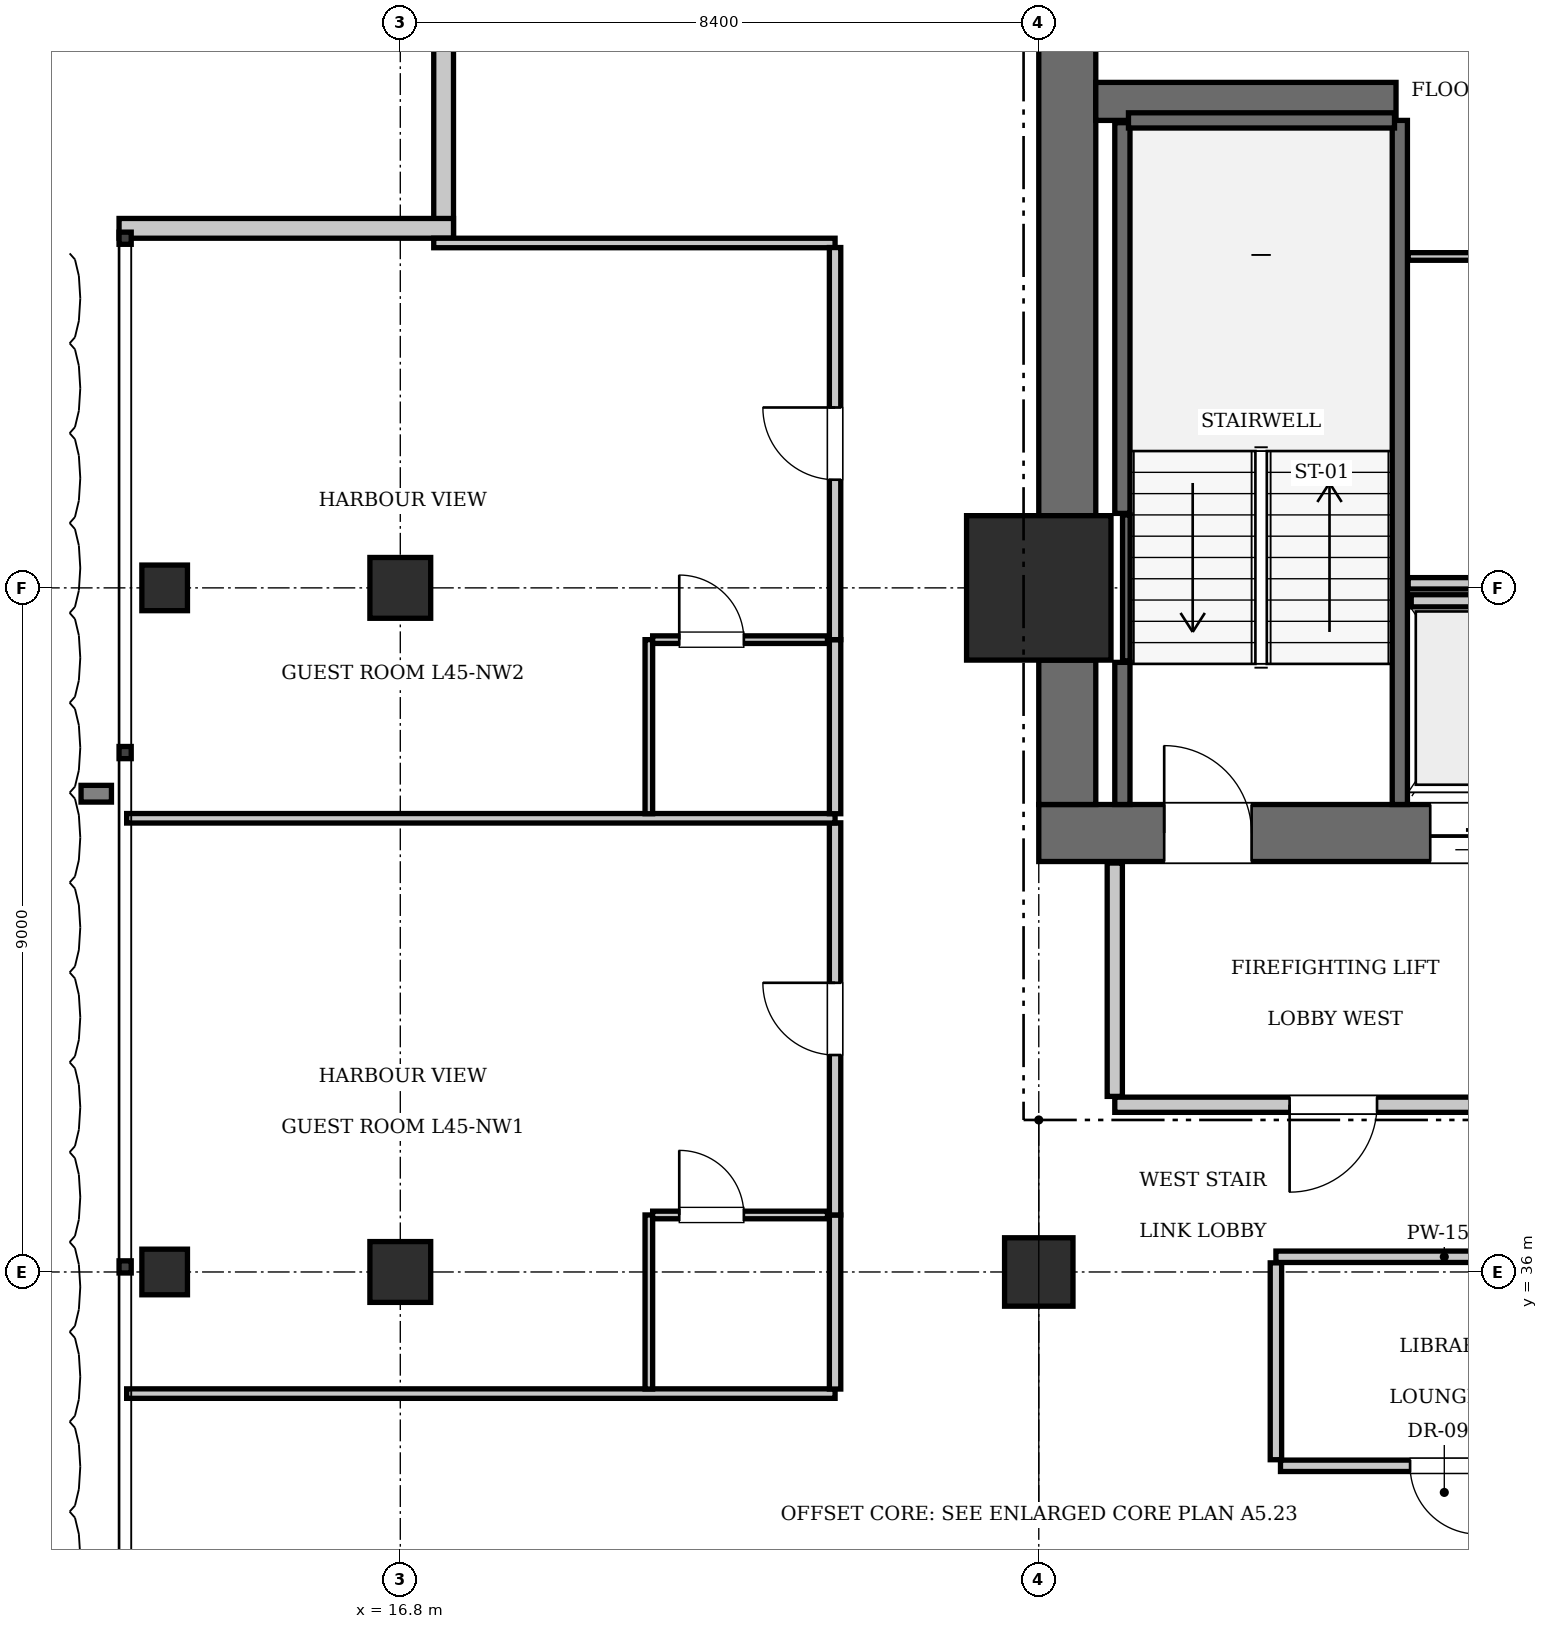
"""IFC4 building model, lengths in metres.
Left out: names, types, materials, properties, quantities, classifications, styles, units other than length and angle.
Written with IfcOpenShell. Run it as: python <this file> out.ifc"""

import sys

from ifc_helpers import new_model, si_unit, direction, frame, frame_2d, origin, origin_2d, place, context, subcontext, project, spatial, rectangle, i_section, extrude, element, fill, save


model = new_model("IFC4")
c1 = context("Model", 3, precision=1e-05, world=origin(), true_north=direction((0.0, 1.0)))
c2 = subcontext(c1, "Body", "Model", "MODEL_VIEW")
j1 = project(units=[si_unit("LENGTHUNIT", "METRE"), si_unit("PLANEANGLEUNIT", "RADIAN")], contexts=[c1])
p1 = place(None, origin())
s1 = spatial("IfcSite", under=j1, at=p1, CompositionType="ELEMENT")
p2 = place(p1, origin())
s2 = spatial("IfcBuilding", under=s1, at=p2, CompositionType="ELEMENT")
p3 = place(p2, frame((0.0, 0.0, 185.15)))
s3 = spatial("IfcBuildingStorey", under=s2, at=p3, CompositionType="ELEMENT", Elevation=185.15)
p4 = place(p3, frame((25.2, 45.0, 0.0), z_axis=(0.0, 0.0, 1.0), x_axis=(1.0, 0.0, 0.0)))
e1 = element("IfcColumn", 1, at=p4, inside=s3, PredefinedType="COLUMN", context=c2, shape_type="SweptSolid", body=[
    extrude(rectangle(XDim=1.9, YDim=1.9, at=origin_2d()), origin(), (0.0, 0.0, 1.0), 3.85),
])
p5 = place(p3, frame((25.2, 41.775, 0.0), z_axis=(0.0, 0.0, 1.0), x_axis=(1.0, 0.0, 0.0)))
e2 = element("IfcWall", 2, at=p5, inside=s3, PredefinedType="SHEAR", context=c2, shape_type="SweptSolid", body=[
    extrude(rectangle(XDim=6.8, YDim=0.75, at=frame_2d((3.4, 0.0))), origin(), (0.0, 0.0, 1.0), 3.85),
])
p6 = place(p5, frame((1.65, 0.0, 0.0)))
e3 = element("IfcOpeningElement", 3, at=p6, cuts=e2, PredefinedType="OPENING", context=c2, shape_type="SweptSolid", body=[
    extrude(rectangle(XDim=1.15, YDim=2.15, at=frame_2d((0.575, 1.075))), frame((0.0, 0.385, 0.0), z_axis=(0.0, -1.0, 0.0), x_axis=(1.0, 0.0, 0.0)), (0.0, 0.0, 1.0), 0.77),
])
p7 = place(p5, frame((5.15, 0.0, 0.0)))
e4 = element("IfcOpeningElement", 4, at=p7, cuts=e2, PredefinedType="OPENING", context=c2, shape_type="SweptSolid", body=[
    extrude(rectangle(XDim=1.1, YDim=2.2, at=frame_2d((0.55, 1.1))), frame((0.0, 0.385, 0.0), z_axis=(0.0, -1.0, 0.0), x_axis=(1.0, 0.0, 0.0)), (0.0, 0.0, 1.0), 0.77),
])
p8 = place(p3, frame((25.575, 42.15, 0.0), z_axis=(0.0, 0.0, 1.0), x_axis=(0.0, 1.0, 0.0)))
e5 = element("IfcWall", 5, at=p8, inside=s3, PredefinedType="SHEAR", context=c2, shape_type="SweptSolid", body=[
    extrude(rectangle(XDim=1.9, YDim=0.75, at=frame_2d((0.95, 0.0))), origin(), (0.0, 0.0, 1.0), 3.85),
])
p9 = place(p3, frame((25.575, 45.95, 0.0), z_axis=(0.0, 0.0, 1.0), x_axis=(0.0, 1.0, 0.0)))
e6 = element("IfcWall", 6, at=p9, inside=s3, PredefinedType="SHEAR", context=c2, shape_type="SweptSolid", body=[
    extrude(rectangle(XDim=7.3, YDim=0.75, at=frame_2d((3.65, 0.0))), origin(), (0.0, 0.0, 1.0), 3.85),
])
p10 = place(p3, frame((25.95, 51.4, 0.0), z_axis=(0.0, 0.0, 1.0), x_axis=(1.0, 0.0, 0.0)))
e7 = element("IfcWall", 7, at=p10, inside=s3, PredefinedType="SHEAR", context=c2, shape_type="SweptSolid", body=[
    extrude(rectangle(XDim=3.95, YDim=0.5, at=frame_2d((1.975, 0.0))), origin(), (0.0, 0.0, 1.0), 3.85),
])
p11 = place(p3, frame((25.2, 36.0, 0.0), z_axis=(0.0, 0.0, 1.0), x_axis=(1.0, 0.0, 0.0)))
e8 = element("IfcColumn", 8, at=p11, inside=s3, PredefinedType="COLUMN", context=c2, shape_type="SweptSolid", body=[
    extrude(rectangle(XDim=0.9, YDim=0.9, at=origin_2d()), origin(), (0.0, 0.0, 1.0), 3.85),
])
for number, where, z_axis, x_axis in (
    (9, (16.8, 36.0, 0.0), (0.0, 0.0, 1.0), (1.0, 0.0, 0.0)),
    (10, (16.8, 45.0, 0.0), (0.0, 0.0, 1.0), (1.0, 0.0, 0.0)),
):
    element("IfcColumn", number, at=place(p3, frame(where, z_axis=z_axis, x_axis=x_axis)), inside=s3, PredefinedType="COLUMN", context=c2, shape_type="SweptSolid", body=[
        extrude(rectangle(XDim=0.8, YDim=0.8, at=origin_2d()), origin(), (0.0, 0.0, 1.0), 3.85),
    ])
for number, where, z_axis, x_axis in (
    (11, (13.7, 36.0, 0.0), (0.0, 0.0, 1.0), (1.0, 0.0, 0.0)),
    (12, (13.7, 45.0, 0.0), (0.0, 0.0, 1.0), (1.0, 0.0, 0.0)),
):
    element("IfcColumn", number, at=place(p3, frame(where, z_axis=z_axis, x_axis=x_axis)), inside=s3, PredefinedType="COLUMN", context=c2, shape_type="SweptSolid", body=[
        extrude(i_section(OverallWidth=0.6, OverallDepth=0.6, WebThickness=0.025, FlangeThickness=0.038, at=origin_2d()), origin(), (0.0, 0.0, 1.0), 3.85),
    ])
p12 = place(p3, frame((29.95, 42.15, 0.0), z_axis=(0.0, 0.0, 1.0), x_axis=(0.0, 1.0, 0.0)))
e13 = element("IfcWall", 13, at=p12, inside=s3, PredefinedType="SOLIDWALL", context=c2, shape_type="SweptSolid", body=[
    extrude(rectangle(XDim=9.0, YDim=0.2, at=frame_2d((4.5, 0.0))), origin(), (0.0, 0.0, 1.0), 3.61),
])
p13 = place(p3, frame((26.3, 42.15, 0.0), z_axis=(0.0, 0.0, 1.0), x_axis=(0.0, 1.0, 0.0)))
e14 = element("IfcWall", 14, at=p13, inside=s3, PredefinedType="SOLIDWALL", context=c2, shape_type="SweptSolid", body=[
    extrude(rectangle(XDim=1.87, YDim=0.2, at=frame_2d((0.935, 0.0))), origin(), (0.0, 0.0, 1.0), 3.61),
])
p14 = place(p3, frame((26.3, 45.98, 0.0), z_axis=(0.0, 0.0, 1.0), x_axis=(0.0, 1.0, 0.0)))
e15 = element("IfcWall", 15, at=p14, inside=s3, PredefinedType="SOLIDWALL", context=c2, shape_type="SweptSolid", body=[
    extrude(rectangle(XDim=5.14, YDim=0.2, at=frame_2d((2.57, 0.0))), origin(), (0.0, 0.0, 1.0), 3.61),
])
p15 = place(p3, frame((26.38, 51.15, 0.0), z_axis=(0.0, 0.0, 1.0), x_axis=(1.0, 0.0, 0.0)))
e16 = element("IfcWall", 16, at=p15, inside=s3, PredefinedType="SOLIDWALL", context=c2, shape_type="SweptSolid", body=[
    extrude(rectangle(XDim=3.5, YDim=0.2, at=frame_2d((1.75, 0.0))), origin(), (0.0, 0.0, 1.0), 3.61),
])
p16 = place(p3, frame((26.352, 44.04, 0.0), z_axis=(0.0, 0.0, 1.0), x_axis=(0.0, 1.0, 0.0)))
e17 = element("IfcWall", 17, at=p16, inside=s3, PredefinedType="SOLIDWALL", context=c2, shape_type="SweptSolid", body=[
    extrude(rectangle(XDim=1.92, YDim=0.1, at=frame_2d((0.96, 0.0))), origin(), (0.0, 0.0, 1.0), 3.61),
])
p17 = place(p3, frame((30.1, 44.83, 0.0), z_axis=(0.0, 0.0, 1.0), x_axis=(1.0, 0.0, 0.0)))
e18 = element("IfcWall", 18, at=p17, inside=s3, PredefinedType="SOLIDWALL", context=c2, shape_type="SweptSolid", body=[
    extrude(rectangle(XDim=1.6, YDim=0.16, at=frame_2d((0.8, 0.0))), origin(), (0.0, 0.0, 1.0), 3.61),
])
for number, where, z_axis, x_axis in (
    (19, (17.37, 49.6, 0.0), (0.0, 0.0, 1.0), (0.0, 1.0, 0.0)),
    (20, (13.1, 49.73, 0.0), (0.0, 0.0, 1.0), (1.0, 0.0, 0.0)),
):
    element("IfcWall", number, at=place(p3, frame(where, z_axis=z_axis, x_axis=x_axis)), inside=s3, PredefinedType="SOLIDWALL", context=c2, shape_type="SweptSolid", body=[
        extrude(rectangle(XDim=4.4, YDim=0.26, at=frame_2d((2.2, 0.0))), origin(), (0.0, 0.0, 1.0), 3.61),
    ])
p18 = place(p3, frame((26.2, 38.2, 0.0), z_axis=(0.0, 0.0, 1.0), x_axis=(1.0, 0.0, 0.0)))
e21 = element("IfcWall", 21, at=p18, inside=s3, PredefinedType="PARTITIONING", context=c2, shape_type="SweptSolid", body=[
    extrude(rectangle(XDim=5.8, YDim=0.2, at=frame_2d((2.9, 0.0))), origin(), (0.0, 0.0, 1.0), 3.61),
])
p19 = place(p18, frame((2.3, 0.0, 0.0)))
e22 = element("IfcOpeningElement", 22, at=p19, cuts=e21, PredefinedType="OPENING", context=c2, shape_type="SweptSolid", body=[
    extrude(rectangle(XDim=1.15, YDim=2.15, at=frame_2d((0.575, 1.075))), frame((0.0, 0.11, 0.0), z_axis=(0.0, -1.0, 0.0), x_axis=(1.0, 0.0, 0.0)), (0.0, 0.0, 1.0), 0.22),
])
p20 = place(p3, frame((26.2, 38.31, 0.0), z_axis=(0.0, 0.0, 1.0), x_axis=(0.0, 1.0, 0.0)))
e23 = element("IfcWall", 23, at=p20, inside=s3, PredefinedType="PARTITIONING", context=c2, shape_type="SweptSolid", body=[
    extrude(rectangle(XDim=3.07, YDim=0.2, at=frame_2d((1.535, 0.0))), origin(), (0.0, 0.0, 1.0), 3.61),
])
p21 = place(p3, frame((30.06, 45.06, 0.0), z_axis=(0.0, 0.0, 1.0), x_axis=(1.0, 0.0, 0.0)))
e24 = element("IfcWall", 24, at=p21, inside=s3, PredefinedType="PARTITIONING", context=c2, shape_type="SweptSolid", body=[
    extrude(rectangle(XDim=3.18, YDim=0.15, at=frame_2d((1.59, 0.0))), origin(), (0.0, 0.0, 1.0), 3.61),
])
p22 = place(p3, frame((30.06, 49.36, 0.0), z_axis=(0.0, 0.0, 1.0), x_axis=(1.0, 0.0, 0.0)))
e25 = element("IfcWall", 25, at=p22, inside=s3, PredefinedType="PARTITIONING", context=c2, shape_type="SweptSolid", body=[
    extrude(rectangle(XDim=3.18, YDim=0.1, at=frame_2d((1.59, 0.0))), origin(), (0.0, 0.0, 1.0), 3.61),
])
p23 = place(p22, frame((1.95, 0.0, 0.0)))
e26 = element("IfcOpeningElement", 26, at=p23, cuts=e25, PredefinedType="OPENING", context=c2, shape_type="SweptSolid", body=[
    extrude(rectangle(XDim=0.8, YDim=2.05, at=frame_2d((0.4, 1.025))), frame((0.0, 0.06, 0.0), z_axis=(0.0, -1.0, 0.0), x_axis=(1.0, 0.0, 0.0)), (0.0, 0.0, 1.0), 0.12),
])
p24 = place(p3, frame((28.32, 36.2, 0.0), z_axis=(0.0, 0.0, 1.0), x_axis=(1.0, 0.0, 0.0)))
e27 = element("IfcWall", 27, at=p24, inside=s3, PredefinedType="PARTITIONING", context=c2, shape_type="SweptSolid", body=[
    extrude(rectangle(XDim=4.43, YDim=0.15, at=frame_2d((2.215, 0.0))), origin(), (0.0, 0.0, 1.0), 3.61),
])
p25 = place(p3, frame((28.32, 33.53, 0.0), z_axis=(0.0, 0.0, 1.0), x_axis=(0.0, 1.0, 0.0)))
e28 = element("IfcWall", 28, at=p25, inside=s3, PredefinedType="PARTITIONING", context=c2, shape_type="SweptSolid", body=[
    extrude(rectangle(XDim=2.59, YDim=0.15, at=frame_2d((1.295, 0.0))), origin(), (0.0, 0.0, 1.0), 3.61),
])
p26 = place(p3, frame((28.38, 33.45, 0.0), z_axis=(0.0, 0.0, 1.0), x_axis=(1.0, 0.0, 0.0)))
e29 = element("IfcWall", 29, at=p26, inside=s3, PredefinedType="PARTITIONING", context=c2, shape_type="SweptSolid", body=[
    extrude(rectangle(XDim=4.31, YDim=0.15, at=frame_2d((2.155, 0.0))), origin(), (0.0, 0.0, 1.0), 3.61),
])
p27 = place(p26, frame((1.705, 0.0, 0.0)))
e30 = element("IfcOpeningElement", 30, at=p27, cuts=e29, PredefinedType="OPENING", context=c2, shape_type="SweptSolid", body=[
    extrude(rectangle(XDim=0.9, YDim=2.1, at=frame_2d((0.45, 1.05))), frame((0.0, 0.085, 0.0), z_axis=(0.0, -1.0, 0.0), x_axis=(1.0, 0.0, 0.0)), (0.0, 0.0, 1.0), 0.17),
])
p28 = place(p3, frame((13.2, 34.4, 0.0), z_axis=(0.0, 0.0, 1.0), x_axis=(1.0, 0.0, 0.0)))
e31 = element("IfcWall", 31, at=p28, inside=s3, PredefinedType="PARTITIONING", context=c2, shape_type="SweptSolid", body=[
    extrude(rectangle(XDim=9.32, YDim=0.125, at=frame_2d((4.66, 0.0))), origin(), (0.0, 0.0, 1.0), 3.61),
])
p29 = place(p3, frame((17.24, 49.538, 0.0), z_axis=(0.0, 0.0, 1.0), x_axis=(1.0, 0.0, 0.0)))
e32 = element("IfcWall", 32, at=p29, inside=s3, PredefinedType="PARTITIONING", context=c2, shape_type="SweptSolid", body=[
    extrude(rectangle(XDim=5.28, YDim=0.125, at=frame_2d((2.64, 0.0))), origin(), (0.0, 0.0, 1.0), 3.61),
])
p30 = place(p3, frame((22.52, 34.46, 0.0), z_axis=(0.0, 0.0, 1.0), x_axis=(0.0, 1.0, 0.0)))
e33 = element("IfcWall", 33, at=p30, inside=s3, PredefinedType="PARTITIONING", context=c2, shape_type="SweptSolid", body=[
    extrude(rectangle(XDim=2.29, YDim=0.15, at=frame_2d((1.145, 0.0))), origin(), (0.0, 0.0, 1.0), 3.61),
])
p31 = place(p3, frame((22.52, 36.75, 0.0), z_axis=(0.0, 0.0, 1.0), x_axis=(0.0, 1.0, 0.0)))
e34 = element("IfcWall", 34, at=p31, inside=s3, PredefinedType="PARTITIONING", context=c2, shape_type="SweptSolid", body=[
    extrude(rectangle(XDim=5.159, YDim=0.15, at=frame_2d((2.579, 0.0))), origin(), (0.0, 0.0, 1.0), 3.61),
])
p32 = place(p31, frame((2.104, 0.0, 0.0)))
e35 = element("IfcOpeningElement", 35, at=p32, cuts=e34, PredefinedType="OPENING", context=c2, shape_type="SweptSolid", body=[
    extrude(rectangle(XDim=0.95, YDim=2.15, at=frame_2d((0.475, 1.075))), frame((0.0, 0.085, 0.0), z_axis=(0.0, -1.0, 0.0), x_axis=(1.0, 0.0, 0.0)), (0.0, 0.0, 1.0), 0.17),
])
p33 = place(p3, frame((20.07, 34.46, 0.0), z_axis=(0.0, 0.0, 1.0), x_axis=(0.0, 1.0, 0.0)))
e36 = element("IfcWall", 36, at=p33, inside=s3, PredefinedType="PARTITIONING", context=c2, shape_type="SweptSolid", body=[
    extrude(rectangle(XDim=2.29, YDim=0.1, at=frame_2d((1.145, 0.0))), origin(), (0.0, 0.0, 1.0), 3.61),
])
p34 = place(p3, frame((20.12, 36.75, 0.0), z_axis=(0.0, 0.0, 1.0), x_axis=(1.0, 0.0, 0.0)))
e37 = element("IfcWall", 37, at=p34, inside=s3, PredefinedType="PARTITIONING", context=c2, shape_type="SweptSolid", body=[
    extrude(rectangle(XDim=2.3, YDim=0.1, at=frame_2d((1.15, 0.0))), origin(), (0.0, 0.0, 1.0), 3.61),
])
p35 = place(p34, frame((0.35, 0.0, 0.0)))
e38 = element("IfcOpeningElement", 38, at=p35, cuts=e37, PredefinedType="OPENING", context=c2, shape_type="SweptSolid", body=[
    extrude(rectangle(XDim=0.85, YDim=2.1, at=frame_2d((0.425, 1.05))), frame((0.0, 0.06, 0.0), z_axis=(0.0, -1.0, 0.0), x_axis=(1.0, 0.0, 0.0)), (0.0, 0.0, 1.0), 0.12),
])
p36 = place(p3, frame((13.2, 41.969, 0.0), z_axis=(0.0, 0.0, 1.0), x_axis=(1.0, 0.0, 0.0)))
e39 = element("IfcWall", 39, at=p36, inside=s3, PredefinedType="PARTITIONING", context=c2, shape_type="SweptSolid", body=[
    extrude(rectangle(XDim=9.32, YDim=0.125, at=frame_2d((4.66, 0.0))), origin(), (0.0, 0.0, 1.0), 3.61),
])
p37 = place(p3, frame((22.52, 42.029, 0.0), z_axis=(0.0, 0.0, 1.0), x_axis=(0.0, 1.0, 0.0)))
e40 = element("IfcWall", 40, at=p37, inside=s3, PredefinedType="PARTITIONING", context=c2, shape_type="SweptSolid", body=[
    extrude(rectangle(XDim=2.29, YDim=0.15, at=frame_2d((1.145, 0.0))), origin(), (0.0, 0.0, 1.0), 3.61),
])
p38 = place(p3, frame((22.52, 44.319, 0.0), z_axis=(0.0, 0.0, 1.0), x_axis=(0.0, 1.0, 0.0)))
e41 = element("IfcWall", 41, at=p38, inside=s3, PredefinedType="PARTITIONING", context=c2, shape_type="SweptSolid", body=[
    extrude(rectangle(XDim=5.159, YDim=0.15, at=frame_2d((2.579, 0.0))), origin(), (0.0, 0.0, 1.0), 3.61),
])
p39 = place(p38, frame((2.104, 0.0, 0.0)))
e42 = element("IfcOpeningElement", 42, at=p39, cuts=e41, PredefinedType="OPENING", context=c2, shape_type="SweptSolid", body=[
    extrude(rectangle(XDim=0.95, YDim=2.15, at=frame_2d((0.475, 1.075))), frame((0.0, 0.085, 0.0), z_axis=(0.0, -1.0, 0.0), x_axis=(1.0, 0.0, 0.0)), (0.0, 0.0, 1.0), 0.17),
])
p40 = place(p3, frame((20.07, 42.029, 0.0), z_axis=(0.0, 0.0, 1.0), x_axis=(0.0, 1.0, 0.0)))
e43 = element("IfcWall", 43, at=p40, inside=s3, PredefinedType="PARTITIONING", context=c2, shape_type="SweptSolid", body=[
    extrude(rectangle(XDim=2.29, YDim=0.1, at=frame_2d((1.145, 0.0))), origin(), (0.0, 0.0, 1.0), 3.61),
])
p41 = place(p3, frame((20.12, 44.319, 0.0), z_axis=(0.0, 0.0, 1.0), x_axis=(1.0, 0.0, 0.0)))
e44 = element("IfcWall", 44, at=p41, inside=s3, PredefinedType="PARTITIONING", context=c2, shape_type="SweptSolid", body=[
    extrude(rectangle(XDim=2.3, YDim=0.1, at=frame_2d((1.15, 0.0))), origin(), (0.0, 0.0, 1.0), 3.61),
])
p42 = place(p41, frame((0.35, 0.0, 0.0)))
e45 = element("IfcOpeningElement", 45, at=p42, cuts=e44, PredefinedType="OPENING", context=c2, shape_type="SweptSolid", body=[
    extrude(rectangle(XDim=0.85, YDim=2.1, at=frame_2d((0.425, 1.05))), frame((0.0, 0.06, 0.0), z_axis=(0.0, -1.0, 0.0), x_axis=(1.0, 0.0, 0.0)), (0.0, 0.0, 1.0), 0.12),
])
p43 = place(p6, origin())
e46 = element("IfcDoor", 46, at=p43, inside=s3, OperationType="SINGLE_SWING_LEFT", PredefinedType="DOOR", context=c2, shape_type="SweptSolid", body=[
    extrude(rectangle(XDim=1.15, YDim=2.15, at=frame_2d((0.575, 1.075))), frame((0.0, 0.025, 0.0), z_axis=(0.0, -1.0, 0.0), x_axis=(1.0, 0.0, 0.0)), (0.0, 0.0, 1.0), 0.05),
])
fill(e3, e46)
p44 = place(p7, frame((1.1, 0.0, 0.0), z_axis=(0.0, 0.0, 1.0), x_axis=(-1.0, 0.0, 0.0)))
e47 = element("IfcDoor", 47, at=p44, inside=s3, OperationType="SLIDING_TO_LEFT", PredefinedType="DOOR", context=c2, shape_type="SweptSolid", body=[
    extrude(rectangle(XDim=1.1, YDim=2.2, at=frame_2d((0.55, 1.1))), frame((0.0, 0.025, 0.0), z_axis=(0.0, -1.0, 0.0), x_axis=(1.0, 0.0, 0.0)), (0.0, 0.0, 1.0), 0.05),
])
fill(e4, e47)
p45 = place(p19, frame((1.15, 0.0, 0.0), z_axis=(0.0, 0.0, 1.0), x_axis=(-1.0, 0.0, 0.0)))
e48 = element("IfcDoor", 48, at=p45, inside=s3, OperationType="SINGLE_SWING_RIGHT", PredefinedType="DOOR", context=c2, shape_type="SweptSolid", body=[
    extrude(rectangle(XDim=1.15, YDim=2.15, at=frame_2d((0.575, 1.075))), frame((0.0, 0.025, 0.0), z_axis=(0.0, -1.0, 0.0), x_axis=(1.0, 0.0, 0.0)), (0.0, 0.0, 1.0), 0.05),
])
fill(e22, e48)
p46 = place(p27, frame((0.9, 0.0, 0.0), z_axis=(0.0, 0.0, 1.0), x_axis=(-1.0, 0.0, 0.0)))
e49 = element("IfcDoor", 49, at=p46, inside=s3, OperationType="SINGLE_SWING_LEFT", PredefinedType="DOOR", context=c2, shape_type="SweptSolid", body=[
    extrude(rectangle(XDim=0.9, YDim=2.1, at=frame_2d((0.45, 1.05))), frame((0.0, 0.025, 0.0), z_axis=(0.0, -1.0, 0.0), x_axis=(1.0, 0.0, 0.0)), (0.0, 0.0, 1.0), 0.05),
])
fill(e30, e49)
p47 = place(p35, origin())
e50 = element("IfcDoor", 50, at=p47, inside=s3, OperationType="SINGLE_SWING_LEFT", PredefinedType="DOOR", context=c2, shape_type="SweptSolid", body=[
    extrude(rectangle(XDim=0.85, YDim=2.1, at=frame_2d((0.425, 1.05))), frame((0.0, 0.025, 0.0), z_axis=(0.0, -1.0, 0.0), x_axis=(1.0, 0.0, 0.0)), (0.0, 0.0, 1.0), 0.05),
])
fill(e38, e50)
p48 = place(p32, origin())
e51 = element("IfcDoor", 51, at=p48, inside=s3, OperationType="SINGLE_SWING_RIGHT", PredefinedType="DOOR", context=c2, shape_type="SweptSolid", body=[
    extrude(rectangle(XDim=0.95, YDim=2.15, at=frame_2d((0.475, 1.075))), frame((0.0, 0.025, 0.0), z_axis=(0.0, -1.0, 0.0), x_axis=(1.0, 0.0, 0.0)), (0.0, 0.0, 1.0), 0.05),
])
fill(e35, e51)
p49 = place(p42, origin())
e52 = element("IfcDoor", 52, at=p49, inside=s3, OperationType="SINGLE_SWING_LEFT", PredefinedType="DOOR", context=c2, shape_type="SweptSolid", body=[
    extrude(rectangle(XDim=0.85, YDim=2.1, at=frame_2d((0.425, 1.05))), frame((0.0, 0.025, 0.0), z_axis=(0.0, -1.0, 0.0), x_axis=(1.0, 0.0, 0.0)), (0.0, 0.0, 1.0), 0.05),
])
fill(e45, e52)
p50 = place(p39, origin())
e53 = element("IfcDoor", 53, at=p50, inside=s3, OperationType="SINGLE_SWING_RIGHT", PredefinedType="DOOR", context=c2, shape_type="SweptSolid", body=[
    extrude(rectangle(XDim=0.95, YDim=2.15, at=frame_2d((0.475, 1.075))), frame((0.0, 0.025, 0.0), z_axis=(0.0, -1.0, 0.0), x_axis=(1.0, 0.0, 0.0)), (0.0, 0.0, 1.0), 0.05),
])
fill(e42, e53)
save(model, sys.argv[1])
